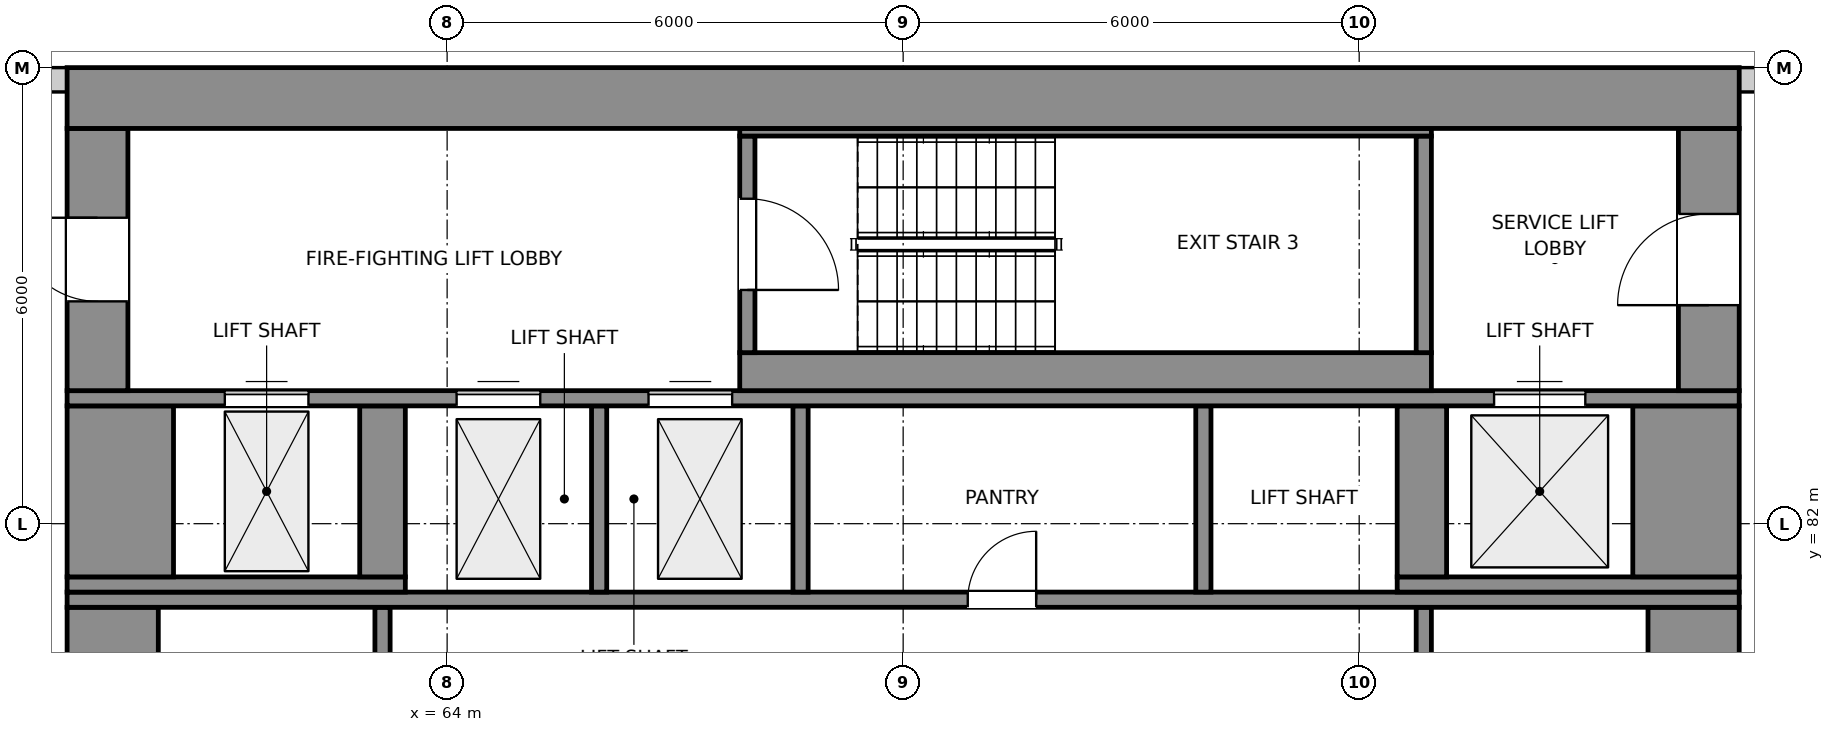
"""IFC4 building model, lengths in metres.
Left out: names, types, materials, properties, quantities, classifications, styles, units other than length and angle.
Written with IfcOpenShell. Run it as: python <this file> out.ifc"""

import sys

from ifc_helpers import new_model, si_unit, direction, frame, frame_2d, origin, place, context, subcontext, project, spatial, rectangle, extrude, element, fill, save


model = new_model("IFC4")
c1 = context("Model", 3, precision=1e-05, world=origin(), true_north=direction((0.0, 1.0)))
c2 = subcontext(c1, "Body", "Model", "MODEL_VIEW")
j1 = project(units=[si_unit("LENGTHUNIT", "METRE"), si_unit("PLANEANGLEUNIT", "RADIAN")], contexts=[c1])
p1 = place(None, origin())
s1 = spatial("IfcSite", under=j1, at=p1, CompositionType="ELEMENT")
p2 = place(p1, origin())
s2 = spatial("IfcBuilding", under=s1, at=p2, CompositionType="ELEMENT")
p3 = place(p2, frame((0.0, 0.0, 204.3)))
s3 = spatial("IfcBuildingStorey", under=s2, at=p3, CompositionType="ELEMENT", Elevation=204.3)
for number, where, z_axis, x_axis in (
    (1, (81.385, 87.84, 0.0), (0.0, 0.0, 1.0), (-1.0, 0.0, 0.0)),
    (2, (59.0, 87.84, 0.0), (0.0, 0.0, 1.0), (-1.0, 0.0, 0.0)),
):
    element("IfcWall", number, at=place(p3, frame(where, z_axis=z_axis, x_axis=x_axis)), inside=s3, PredefinedType="SOLIDWALL", context=c2, shape_type="SweptSolid", body=[
        extrude(rectangle(XDim=0.385, YDim=0.32, at=frame_2d((0.192, 0.0))), origin(), (0.0, 0.0, 1.0), 3.6),
    ])
for number, where, z_axis, x_axis in (
    (3, (59.6, 71.8, 0.0), (0.0, 0.0, 1.0), (0.0, 1.0, 0.0)),
    (4, (80.4, 71.8, 0.0), (0.0, 0.0, 1.0), (0.0, 1.0, 0.0)),
):
    element("IfcWall", number, at=place(p3, frame(where, z_axis=z_axis, x_axis=x_axis)), inside=s3, PredefinedType="SHEAR", context=c2, shape_type="SweptSolid", body=[
        extrude(rectangle(XDim=9.1, YDim=1.2, at=frame_2d((4.55, 0.0))), origin(), (0.0, 0.0, 1.0), 3.9),
    ])
for number, where, z_axis, x_axis in (
    (5, (63.15, 77.7, 0.0), (0.0, 0.0, 1.0), (0.0, 1.0, 0.0)),
    (6, (76.85, 77.7, 0.0), (0.0, 0.0, 1.0), (0.0, 1.0, 0.0)),
):
    element("IfcWall", number, at=place(p3, frame(where, z_axis=z_axis, x_axis=x_axis)), inside=s3, PredefinedType="SHEAR", context=c2, shape_type="SweptSolid", body=[
        extrude(rectangle(XDim=3.2, YDim=0.2, at=frame_2d((1.6, 0.0))), origin(), (0.0, 0.0, 1.0), 3.9),
    ])
p4 = place(p3, frame((59.0, 81.0, 0.0), z_axis=(0.0, 0.0, 1.0), x_axis=(1.0, 0.0, 0.0)))
e7 = element("IfcWall", 7, at=p4, inside=s3, PredefinedType="SHEAR", context=c2, shape_type="SweptSolid", body=[
    extrude(rectangle(XDim=22.0, YDim=0.2, at=frame_2d((11.0, 0.0))), origin(), (0.0, 0.0, 1.0), 3.9),
])
p5 = place(p4, frame((11.85, 0.0, 0.0)))
e8 = element("IfcOpeningElement", 8, at=p5, cuts=e7, PredefinedType="OPENING", context=c2, shape_type="SweptSolid", body=[
    extrude(rectangle(XDim=0.9, YDim=2.1, at=frame_2d((0.45, 1.05))), frame((0.0, 0.11, 0.0), z_axis=(0.0, -1.0, 0.0), x_axis=(1.0, 0.0, 0.0)), (0.0, 0.0, 1.0), 0.22),
])
p6 = place(p3, frame((59.0, 81.2, 0.0), z_axis=(0.0, 0.0, 1.0), x_axis=(1.0, 0.0, 0.0)))
e9 = element("IfcWall", 9, at=p6, inside=s3, PredefinedType="SHEAR", context=c2, shape_type="SweptSolid", body=[
    extrude(rectangle(XDim=4.45, YDim=0.2, at=frame_2d((2.225, 0.0))), origin(), (0.0, 0.0, 1.0), 3.9),
])
for number, where, z_axis, x_axis in (
    (10, (66.0, 81.1, 0.0), (0.0, 0.0, 1.0), (0.0, 1.0, 0.0)),
    (11, (68.65, 81.1, 0.0), (0.0, 0.0, 1.0), (0.0, 1.0, 0.0)),
    (12, (73.95, 81.1, 0.0), (0.0, 0.0, 1.0), (0.0, 1.0, 0.0)),
):
    element("IfcWall", number, at=place(p3, frame(where, z_axis=z_axis, x_axis=x_axis)), inside=s3, PredefinedType="SHEAR", context=c2, shape_type="SweptSolid", body=[
        extrude(rectangle(XDim=2.45, YDim=0.2, at=frame_2d((1.225, 0.0))), origin(), (0.0, 0.0, 1.0), 3.9),
    ])
p7 = place(p3, frame((76.5, 81.2, 0.0), z_axis=(0.0, 0.0, 1.0), x_axis=(1.0, 0.0, 0.0)))
e13 = element("IfcWall", 13, at=p7, inside=s3, PredefinedType="SHEAR", context=c2, shape_type="SweptSolid", body=[
    extrude(rectangle(XDim=4.5, YDim=0.2, at=frame_2d((2.25, 0.0))), origin(), (0.0, 0.0, 1.0), 3.9),
])
p8 = place(p3, frame((59.7, 81.3, 0.0), z_axis=(0.0, 0.0, 1.0), x_axis=(0.0, 1.0, 0.0)))
e14 = element("IfcWall", 14, at=p8, inside=s3, PredefinedType="SHEAR", context=c2, shape_type="SweptSolid", body=[
    extrude(rectangle(XDim=2.25, YDim=1.4, at=frame_2d((1.125, 0.0))), origin(), (0.0, 0.0, 1.0), 3.9),
])
p9 = place(p3, frame((63.15, 81.3, 0.0), z_axis=(0.0, 0.0, 1.0), x_axis=(0.0, 1.0, 0.0)))
e15 = element("IfcWall", 15, at=p9, inside=s3, PredefinedType="SHEAR", context=c2, shape_type="SweptSolid", body=[
    extrude(rectangle(XDim=2.25, YDim=0.6, at=frame_2d((1.125, 0.0))), origin(), (0.0, 0.0, 1.0), 3.9),
])
p10 = place(p3, frame((76.825, 81.3, 0.0), z_axis=(0.0, 0.0, 1.0), x_axis=(0.0, 1.0, 0.0)))
e16 = element("IfcWall", 16, at=p10, inside=s3, PredefinedType="SHEAR", context=c2, shape_type="SweptSolid", body=[
    extrude(rectangle(XDim=2.25, YDim=0.65, at=frame_2d((1.125, 0.0))), origin(), (0.0, 0.0, 1.0), 3.9),
])
p11 = place(p3, frame((80.3, 81.3, 0.0), z_axis=(0.0, 0.0, 1.0), x_axis=(0.0, 1.0, 0.0)))
e17 = element("IfcWall", 17, at=p11, inside=s3, PredefinedType="SHEAR", context=c2, shape_type="SweptSolid", body=[
    extrude(rectangle(XDim=2.25, YDim=1.4, at=frame_2d((1.125, 0.0))), origin(), (0.0, 0.0, 1.0), 3.9),
])
p12 = place(p3, frame((59.0, 83.65, 0.0), z_axis=(0.0, 0.0, 1.0), x_axis=(1.0, 0.0, 0.0)))
e18 = element("IfcWall", 18, at=p12, inside=s3, PredefinedType="SHEAR", context=c2, shape_type="SweptSolid", body=[
    extrude(rectangle(XDim=22.0, YDim=0.2, at=frame_2d((11.0, 0.0))), origin(), (0.0, 0.0, 1.0), 3.9),
])
p13 = place(p12, frame((5.125, 0.0, 0.0)))
e19 = element("IfcOpeningElement", 19, at=p13, cuts=e18, PredefinedType="OPENING", context=c2, shape_type="SweptSolid", body=[
    extrude(rectangle(XDim=1.1, YDim=2.1, at=frame_2d((0.55, 1.05))), frame((0.0, 0.11, 0.0), z_axis=(0.0, -1.0, 0.0), x_axis=(1.0, 0.0, 0.0)), (0.0, 0.0, 1.0), 0.22),
])
p14 = place(p12, frame((7.65, 0.0, 0.0)))
e20 = element("IfcOpeningElement", 20, at=p14, cuts=e18, PredefinedType="OPENING", context=c2, shape_type="SweptSolid", body=[
    extrude(rectangle(XDim=1.1, YDim=2.1, at=frame_2d((0.55, 1.05))), frame((0.0, 0.11, 0.0), z_axis=(0.0, -1.0, 0.0), x_axis=(1.0, 0.0, 0.0)), (0.0, 0.0, 1.0), 0.22),
])
p15 = place(p12, frame((18.775, 0.0, 0.0)))
e21 = element("IfcOpeningElement", 21, at=p15, cuts=e18, PredefinedType="OPENING", context=c2, shape_type="SweptSolid", body=[
    extrude(rectangle(XDim=1.2, YDim=2.1, at=frame_2d((0.6, 1.05))), frame((0.0, 0.11, 0.0), z_axis=(0.0, -1.0, 0.0), x_axis=(1.0, 0.0, 0.0)), (0.0, 0.0, 1.0), 0.22),
])
p16 = place(p12, frame((2.075, 0.0, 0.0)))
e22 = element("IfcOpeningElement", 22, at=p16, cuts=e18, PredefinedType="OPENING", context=c2, shape_type="SweptSolid", body=[
    extrude(rectangle(XDim=1.1, YDim=2.1, at=frame_2d((0.55, 1.05))), frame((0.0, 0.11, 0.0), z_axis=(0.0, -1.0, 0.0), x_axis=(1.0, 0.0, 0.0)), (0.0, 0.0, 1.0), 0.22),
])
p17 = place(p3, frame((59.4, 83.75, 0.0), z_axis=(0.0, 0.0, 1.0), x_axis=(0.0, 1.0, 0.0)))
e23 = element("IfcWall", 23, at=p17, inside=s3, PredefinedType="SHEAR", context=c2, shape_type="SweptSolid", body=[
    extrude(rectangle(XDim=3.45, YDim=0.8, at=frame_2d((1.725, 0.0))), origin(), (0.0, 0.0, 1.0), 3.9),
])
p18 = place(p17, frame((1.175, 0.0, 0.0)))
e24 = element("IfcOpeningElement", 24, at=p18, cuts=e23, PredefinedType="OPENING", context=c2, shape_type="SweptSolid", body=[
    extrude(rectangle(XDim=1.1, YDim=2.1, at=frame_2d((0.55, 1.05))), frame((0.0, 0.41, 0.0), z_axis=(0.0, -1.0, 0.0), x_axis=(1.0, 0.0, 0.0)), (0.0, 0.0, 1.0), 0.82),
])
p19 = place(p3, frame((67.85, 84.0, 0.0), z_axis=(0.0, 0.0, 1.0), x_axis=(1.0, 0.0, 0.0)))
e25 = element("IfcWall", 25, at=p19, inside=s3, PredefinedType="SHEAR", context=c2, shape_type="SweptSolid", body=[
    extrude(rectangle(XDim=9.1, YDim=0.5, at=frame_2d((4.55, 0.0))), origin(), (0.0, 0.0, 1.0), 3.9),
])
p20 = place(p3, frame((80.6, 83.75, 0.0), z_axis=(0.0, 0.0, 1.0), x_axis=(0.0, 1.0, 0.0)))
e26 = element("IfcWall", 26, at=p20, inside=s3, PredefinedType="SHEAR", context=c2, shape_type="SweptSolid", body=[
    extrude(rectangle(XDim=3.45, YDim=0.8, at=frame_2d((1.725, 0.0))), origin(), (0.0, 0.0, 1.0), 3.9),
])
p21 = place(p20, frame((1.125, 0.0, 0.0)))
e27 = element("IfcOpeningElement", 27, at=p21, cuts=e26, PredefinedType="OPENING", context=c2, shape_type="SweptSolid", body=[
    extrude(rectangle(XDim=1.2, YDim=2.1, at=frame_2d((0.6, 1.05))), frame((0.0, 0.41, 0.0), z_axis=(0.0, -1.0, 0.0), x_axis=(1.0, 0.0, 0.0)), (0.0, 0.0, 1.0), 0.82),
])
p22 = place(p3, frame((67.95, 84.25, 0.0), z_axis=(0.0, 0.0, 1.0), x_axis=(0.0, 1.0, 0.0)))
e28 = element("IfcWall", 28, at=p22, inside=s3, PredefinedType="SHEAR", context=c2, shape_type="SweptSolid", body=[
    extrude(rectangle(XDim=2.85, YDim=0.2, at=frame_2d((1.425, 0.0))), origin(), (0.0, 0.0, 1.0), 3.9),
])
p23 = place(p22, frame((0.825, 0.0, 0.0)))
e29 = element("IfcOpeningElement", 29, at=p23, cuts=e28, PredefinedType="OPENING", context=c2, shape_type="SweptSolid", body=[
    extrude(rectangle(XDim=1.2, YDim=2.1, at=frame_2d((0.6, 1.05))), frame((0.0, 0.11, 0.0), z_axis=(0.0, -1.0, 0.0), x_axis=(1.0, 0.0, 0.0)), (0.0, 0.0, 1.0), 0.22),
])
p24 = place(p3, frame((76.85, 84.25, 0.0), z_axis=(0.0, 0.0, 1.0), x_axis=(0.0, 1.0, 0.0)))
e30 = element("IfcWall", 30, at=p24, inside=s3, PredefinedType="SHEAR", context=c2, shape_type="SweptSolid", body=[
    extrude(rectangle(XDim=2.85, YDim=0.2, at=frame_2d((1.425, 0.0))), origin(), (0.0, 0.0, 1.0), 3.9),
])
p25 = place(p3, frame((67.85, 87.15, 0.0), z_axis=(0.0, 0.0, 1.0), x_axis=(1.0, 0.0, 0.0)))
e31 = element("IfcWall", 31, at=p25, inside=s3, PredefinedType="SHEAR", context=c2, shape_type="SweptSolid", body=[
    extrude(rectangle(XDim=9.1, YDim=0.1, at=frame_2d((4.55, 0.0))), origin(), (0.0, 0.0, 1.0), 3.9),
])
p26 = place(p3, frame((59.0, 87.6, 0.0), z_axis=(0.0, 0.0, 1.0), x_axis=(1.0, 0.0, 0.0)))
e32 = element("IfcWall", 32, at=p26, inside=s3, PredefinedType="SHEAR", context=c2, shape_type="SweptSolid", body=[
    extrude(rectangle(XDim=22.0, YDim=0.8, at=frame_2d((11.0, 0.0))), origin(), (0.0, 0.0, 1.0), 3.9),
])
p27 = place(p23, frame((1.2, 0.0, 0.0), z_axis=(0.0, 0.0, 1.0), x_axis=(-1.0, 0.0, 0.0)))
e33 = element("IfcDoor", 33, at=p27, inside=s3, OperationType="SINGLE_SWING_RIGHT", PredefinedType="DOOR", context=c2, shape_type="SweptSolid", body=[
    extrude(rectangle(XDim=1.2, YDim=2.1, at=frame_2d((0.6, 1.05))), frame((0.0, 0.025, 0.0), z_axis=(0.0, -1.0, 0.0), x_axis=(1.0, 0.0, 0.0)), (0.0, 0.0, 1.0), 0.05),
])
fill(e29, e33)
p28 = place(p18, origin())
e34 = element("IfcDoor", 34, at=p28, inside=s3, OperationType="SINGLE_SWING_RIGHT", PredefinedType="DOOR", context=c2, shape_type="SweptSolid", body=[
    extrude(rectangle(XDim=1.1, YDim=2.1, at=frame_2d((0.55, 1.05))), frame((0.0, 0.025, 0.0), z_axis=(0.0, -1.0, 0.0), x_axis=(1.0, 0.0, 0.0)), (0.0, 0.0, 1.0), 0.05),
])
fill(e24, e34)
p29 = place(p21, origin())
e35 = element("IfcDoor", 35, at=p29, inside=s3, OperationType="SINGLE_SWING_LEFT", PredefinedType="DOOR", context=c2, shape_type="SweptSolid", body=[
    extrude(rectangle(XDim=1.2, YDim=2.1, at=frame_2d((0.6, 1.05))), frame((0.0, 0.025, 0.0), z_axis=(0.0, -1.0, 0.0), x_axis=(1.0, 0.0, 0.0)), (0.0, 0.0, 1.0), 0.05),
])
fill(e27, e35)
p30 = place(p13, origin())
e36 = element("IfcDoor", 36, at=p30, inside=s3, OperationType="DOUBLE_DOOR_SLIDING", PredefinedType="DOOR", context=c2, shape_type="SweptSolid", body=[
    extrude(rectangle(XDim=1.1, YDim=2.1, at=frame_2d((0.55, 1.05))), frame((0.0, 0.025, 0.0), z_axis=(0.0, -1.0, 0.0), x_axis=(1.0, 0.0, 0.0)), (0.0, 0.0, 1.0), 0.05),
])
fill(e19, e36)
p31 = place(p14, origin())
e37 = element("IfcDoor", 37, at=p31, inside=s3, OperationType="DOUBLE_DOOR_SLIDING", PredefinedType="DOOR", context=c2, shape_type="SweptSolid", body=[
    extrude(rectangle(XDim=1.1, YDim=2.1, at=frame_2d((0.55, 1.05))), frame((0.0, 0.025, 0.0), z_axis=(0.0, -1.0, 0.0), x_axis=(1.0, 0.0, 0.0)), (0.0, 0.0, 1.0), 0.05),
])
fill(e20, e37)
p32 = place(p15, origin())
e38 = element("IfcDoor", 38, at=p32, inside=s3, OperationType="DOUBLE_DOOR_SLIDING", PredefinedType="DOOR", context=c2, shape_type="SweptSolid", body=[
    extrude(rectangle(XDim=1.2, YDim=2.1, at=frame_2d((0.6, 1.05))), frame((0.0, 0.025, 0.0), z_axis=(0.0, -1.0, 0.0), x_axis=(1.0, 0.0, 0.0)), (0.0, 0.0, 1.0), 0.05),
])
fill(e21, e38)
p33 = place(p16, origin())
e39 = element("IfcDoor", 39, at=p33, inside=s3, OperationType="DOUBLE_DOOR_SLIDING", PredefinedType="DOOR", context=c2, shape_type="SweptSolid", body=[
    extrude(rectangle(XDim=1.1, YDim=2.1, at=frame_2d((0.55, 1.05))), frame((0.0, 0.025, 0.0), z_axis=(0.0, -1.0, 0.0), x_axis=(1.0, 0.0, 0.0)), (0.0, 0.0, 1.0), 0.05),
])
fill(e22, e39)
p34 = place(p5, origin())
e40 = element("IfcDoor", 40, at=p34, inside=s3, OperationType="SINGLE_SWING_RIGHT", PredefinedType="DOOR", context=c2, shape_type="SweptSolid", body=[
    extrude(rectangle(XDim=0.9, YDim=2.1, at=frame_2d((0.45, 1.05))), frame((0.0, 0.025, 0.0), z_axis=(0.0, -1.0, 0.0), x_axis=(1.0, 0.0, 0.0)), (0.0, 0.0, 1.0), 0.05),
])
fill(e8, e40)
save(model, sys.argv[1])
